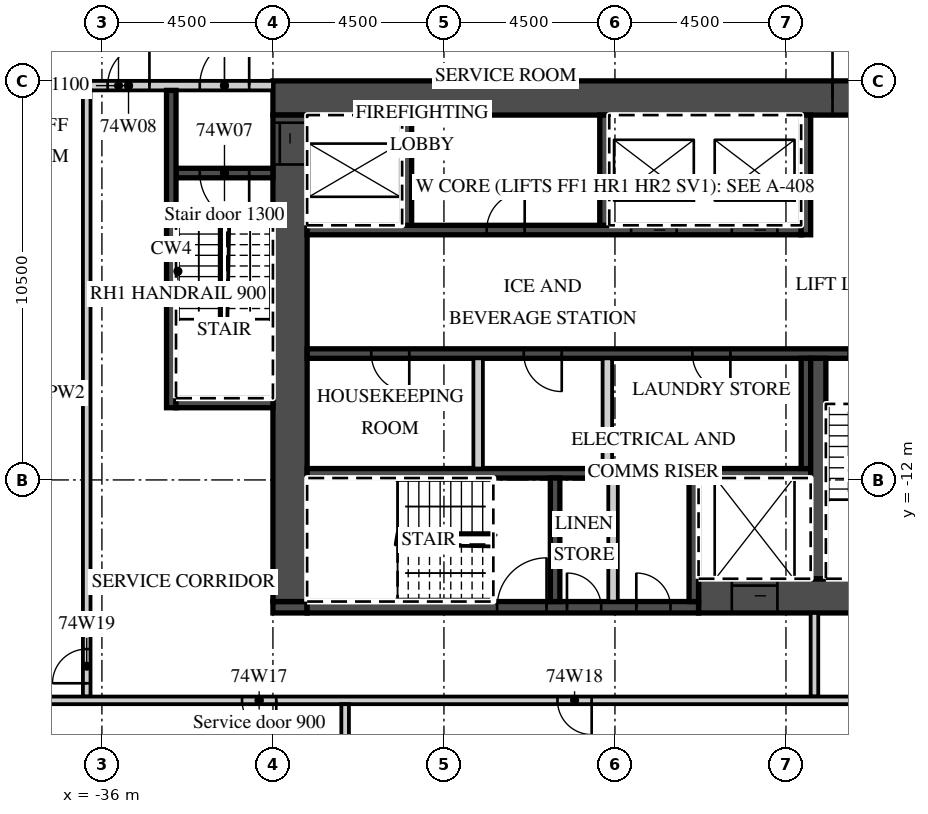
"""IFC4 building model, lengths in metres.
Left out: names, types, materials, properties, quantities, classifications, styles, units other than length and angle.
Written with IfcOpenShell. Run it as: python <this file> out.ifc"""

import sys

from ifc_helpers import new_model, si_unit, direction, frame, frame_2d, origin, place, context, subcontext, project, spatial, rectangle, extrude, element, fill, save


model = new_model("IFC4")
c1 = context("Model", 3, precision=1e-05, world=origin(), true_north=direction((0.0, 1.0)))
c2 = subcontext(c1, "Body", "Model", "MODEL_VIEW")
j1 = project(units=[si_unit("LENGTHUNIT", "METRE"), si_unit("PLANEANGLEUNIT", "RADIAN")], contexts=[c1])
p1 = place(None, origin())
s1 = spatial("IfcSite", under=j1, at=p1, CompositionType="ELEMENT")
p2 = place(p1, origin())
s2 = spatial("IfcBuilding", under=s1, at=p2, CompositionType="ELEMENT")
p3 = place(p2, frame((0.0, 0.0, 294.9)))
s3 = spatial("IfcBuildingStorey", under=s2, at=p3, CompositionType="ELEMENT", Elevation=294.9)
p4 = place(p3, frame((-31.5, -1.95, 0.0), z_axis=(0.0, 0.0, 1.0), x_axis=(1.0, 0.0, 0.0)))
e1 = element("IfcWall", 1, at=p4, inside=s3, PredefinedType="SHEAR", context=c2, shape_type="SweptSolid", body=[
    extrude(rectangle(XDim=18.0, YDim=0.9, at=frame_2d((9.0, 0.0))), origin(), (0.0, 0.0, 1.0), 3.02),
])
p5 = place(p4, frame((14.725, 0.0, 0.0)))
e2 = element("IfcOpeningElement", 2, at=p5, cuts=e1, PredefinedType="OPENING", context=c2, shape_type="SweptSolid", body=[
    extrude(rectangle(XDim=1.8, YDim=2.1, at=frame_2d((0.9, 1.05))), frame((0.0, 0.46, 0.0), z_axis=(0.0, -1.0, 0.0), x_axis=(1.0, 0.0, 0.0)), (0.0, 0.0, 1.0), 0.92),
])
p6 = place(p3, frame((-20.3, -15.05, 0.0), z_axis=(0.0, 0.0, 1.0), x_axis=(1.0, 0.0, 0.0)))
e3 = element("IfcWall", 3, at=p6, inside=s3, PredefinedType="SHEAR", context=c2, shape_type="SweptSolid", body=[
    extrude(rectangle(XDim=6.8, YDim=0.9, at=frame_2d((3.4, 0.0))), origin(), (0.0, 0.0, 1.0), 3.02),
])
p7 = place(p6, frame((0.875, 0.0, 0.0)))
e4 = element("IfcOpeningElement", 4, at=p7, cuts=e3, PredefinedType="OPENING", context=c2, shape_type="SweptSolid", body=[
    extrude(rectangle(XDim=1.2, YDim=2.1, at=frame_2d((0.6, 1.05))), frame((0.0, 0.46, 0.0), z_axis=(0.0, -1.0, 0.0), x_axis=(1.0, 0.0, 0.0)), (0.0, 0.0, 1.0), 0.92),
])
p8 = place(p3, frame((-31.5, -15.35, 0.0), z_axis=(0.0, 0.0, 1.0), x_axis=(1.0, 0.0, 0.0)))
e5 = element("IfcWall", 5, at=p8, inside=s3, PredefinedType="SHEAR", context=c2, shape_type="SweptSolid", body=[
    extrude(rectangle(XDim=0.9, YDim=0.3, at=frame_2d((0.45, 0.0))), origin(), (0.0, 0.0, 1.0), 3.02),
])
p9 = place(p3, frame((-30.6, -15.35, 0.0), z_axis=(0.0, 0.0, 1.0), x_axis=(1.0, 0.0, 0.0)))
e6 = element("IfcWall", 6, at=p9, inside=s3, PredefinedType="SHEAR", context=c2, shape_type="SweptSolid", body=[
    extrude(rectangle(XDim=10.3, YDim=0.3, at=frame_2d((5.15, 0.0))), origin(), (0.0, 0.0, 1.0), 3.02),
])
p10 = place(p9, frame((5.0, 0.0, 0.0)))
e7 = element("IfcOpeningElement", 7, at=p10, cuts=e6, PredefinedType="OPENING", context=c2, shape_type="SweptSolid", body=[
    extrude(rectangle(XDim=1.3, YDim=2.1, at=frame_2d((0.65, 1.05))), frame((0.0, 0.16, 0.0), z_axis=(0.0, -1.0, 0.0), x_axis=(1.0, 0.0, 0.0)), (0.0, 0.0, 1.0), 0.32),
])
p11 = place(p9, frame((6.837, 0.0, 0.0)))
e8 = element("IfcOpeningElement", 8, at=p11, cuts=e6, PredefinedType="OPENING", context=c2, shape_type="SweptSolid", body=[
    extrude(rectangle(XDim=0.9, YDim=2.1, at=frame_2d((0.45, 1.05))), frame((0.0, 0.16, 0.0), z_axis=(0.0, -1.0, 0.0), x_axis=(1.0, 0.0, 0.0)), (0.0, 0.0, 1.0), 0.32),
])
p12 = place(p9, frame((8.663, 0.0, 0.0)))
e9 = element("IfcOpeningElement", 9, at=p12, cuts=e6, PredefinedType="OPENING", context=c2, shape_type="SweptSolid", body=[
    extrude(rectangle(XDim=0.9, YDim=2.1, at=frame_2d((0.45, 1.05))), frame((0.0, 0.16, 0.0), z_axis=(0.0, -1.0, 0.0), x_axis=(1.0, 0.0, 0.0)), (0.0, 0.0, 1.0), 0.32),
])
p13 = place(p3, frame((-31.05, -15.2, 0.0), z_axis=(0.0, 0.0, 1.0), x_axis=(0.0, 1.0, 0.0)))
e10 = element("IfcWall", 10, at=p13, inside=s3, PredefinedType="SHEAR", context=c2, shape_type="SweptSolid", body=[
    extrude(rectangle(XDim=12.8, YDim=0.9, at=frame_2d((6.4, 0.0))), origin(), (0.0, 0.0, 1.0), 3.02),
])
p14 = place(p13, frame((11.5, 0.0, 0.0)))
e11 = element("IfcOpeningElement", 11, at=p14, cuts=e10, PredefinedType="OPENING", context=c2, shape_type="SweptSolid", body=[
    extrude(rectangle(XDim=1.1, YDim=2.1, at=frame_2d((0.55, 1.05))), frame((0.0, 0.46, 0.0), z_axis=(0.0, -1.0, 0.0), x_axis=(1.0, 0.0, 0.0)), (0.0, 0.0, 1.0), 0.92),
])
p15 = place(p3, frame((-30.6, -5.425, 0.0), z_axis=(0.0, 0.0, 1.0), x_axis=(1.0, 0.0, 0.0)))
e12 = element("IfcWall", 12, at=p15, inside=s3, PredefinedType="SHEAR", context=c2, shape_type="SweptSolid", body=[
    extrude(rectangle(XDim=13.0, YDim=0.25, at=frame_2d((6.5, 0.0))), origin(), (0.0, 0.0, 1.0), 3.02),
])
p16 = place(p15, frame((8.525, 0.0, 0.0)))
e13 = element("IfcOpeningElement", 13, at=p16, cuts=e12, PredefinedType="OPENING", context=c2, shape_type="SweptSolid", body=[
    extrude(rectangle(XDim=1.2, YDim=2.1, at=frame_2d((0.6, 1.05))), frame((0.0, 0.135, 0.0), z_axis=(0.0, -1.0, 0.0), x_axis=(1.0, 0.0, 0.0)), (0.0, 0.0, 1.0), 0.27),
])
p17 = place(p15, frame((11.175, 0.0, 0.0)))
e14 = element("IfcOpeningElement", 14, at=p17, cuts=e12, PredefinedType="OPENING", context=c2, shape_type="SweptSolid", body=[
    extrude(rectangle(XDim=1.2, YDim=2.1, at=frame_2d((0.6, 1.05))), frame((0.0, 0.135, 0.0), z_axis=(0.0, -1.0, 0.0), x_axis=(1.0, 0.0, 0.0)), (0.0, 0.0, 1.0), 0.27),
])
p18 = place(p15, frame((4.725, 0.0, 0.0)))
e15 = element("IfcOpeningElement", 15, at=p18, cuts=e12, PredefinedType="OPENING", context=c2, shape_type="SweptSolid", body=[
    extrude(rectangle(XDim=1.0, YDim=2.1, at=frame_2d((0.5, 1.05))), frame((0.0, 0.135, 0.0), z_axis=(0.0, -1.0, 0.0), x_axis=(1.0, 0.0, 0.0)), (0.0, 0.0, 1.0), 0.27),
])
p19 = place(p3, frame((-17.475, -5.55, 0.0), z_axis=(0.0, 0.0, 1.0), x_axis=(0.0, 1.0, 0.0)))
e16 = element("IfcWall", 16, at=p19, inside=s3, PredefinedType="SHEAR", context=c2, shape_type="SweptSolid", body=[
    extrude(rectangle(XDim=3.15, YDim=0.25, at=frame_2d((1.575, 0.0))), origin(), (0.0, 0.0, 1.0), 3.02),
])
for number, where, z_axis, x_axis in (
    (17, (-27.975, -5.3, 0.0), (0.0, 0.0, 1.0), (0.0, 1.0, 0.0)),
    (18, (-22.775, -5.3, 0.0), (0.0, 0.0, 1.0), (0.0, 1.0, 0.0)),
):
    element("IfcWall", number, at=place(p3, frame(where, z_axis=z_axis, x_axis=x_axis)), inside=s3, PredefinedType="SHEAR", context=c2, shape_type="SweptSolid", body=[
        extrude(rectangle(XDim=2.9, YDim=0.25, at=frame_2d((1.45, 0.0))), origin(), (0.0, 0.0, 1.0), 3.02),
    ])
p20 = place(p3, frame((-30.6, -8.675, 0.0), z_axis=(0.0, 0.0, 1.0), x_axis=(1.0, 0.0, 0.0)))
e19 = element("IfcWall", 19, at=p20, inside=s3, PredefinedType="SHEAR", context=c2, shape_type="SweptSolid", body=[
    extrude(rectangle(XDim=16.2, YDim=0.25, at=frame_2d((8.1, 0.0))), origin(), (0.0, 0.0, 1.0), 3.02),
])
p21 = place(p20, frame((14.25, 0.0, 0.0)))
e20 = element("IfcOpeningElement", 20, at=p21, cuts=e19, PredefinedType="OPENING", context=c2, shape_type="SweptSolid", body=[
    extrude(rectangle(XDim=1.3, YDim=2.1, at=frame_2d((0.65, 1.05))), frame((0.0, 0.135, 0.0), z_axis=(0.0, -1.0, 0.0), x_axis=(1.0, 0.0, 0.0)), (0.0, 0.0, 1.0), 0.27),
])
p22 = place(p20, frame((1.688, 0.0, 0.0)))
e21 = element("IfcOpeningElement", 21, at=p22, cuts=e19, PredefinedType="OPENING", context=c2, shape_type="SweptSolid", body=[
    extrude(rectangle(XDim=1.0, YDim=2.1, at=frame_2d((0.5, 1.05))), frame((0.0, 0.135, 0.0), z_axis=(0.0, -1.0, 0.0), x_axis=(1.0, 0.0, 0.0)), (0.0, 0.0, 1.0), 0.27),
])
p23 = place(p20, frame((5.7, 0.0, 0.0)))
e22 = element("IfcOpeningElement", 22, at=p23, cuts=e19, PredefinedType="OPENING", context=c2, shape_type="SweptSolid", body=[
    extrude(rectangle(XDim=1.0, YDim=2.1, at=frame_2d((0.5, 1.05))), frame((0.0, 0.135, 0.0), z_axis=(0.0, -1.0, 0.0), x_axis=(1.0, 0.0, 0.0)), (0.0, 0.0, 1.0), 0.27),
])
p24 = place(p20, frame((10.137, 0.0, 0.0)))
e23 = element("IfcOpeningElement", 23, at=p24, cuts=e19, PredefinedType="OPENING", context=c2, shape_type="SweptSolid", body=[
    extrude(rectangle(XDim=1.0, YDim=2.1, at=frame_2d((0.5, 1.05))), frame((0.0, 0.135, 0.0), z_axis=(0.0, -1.0, 0.0), x_axis=(1.0, 0.0, 0.0)), (0.0, 0.0, 1.0), 0.27),
])
p25 = place(p3, frame((-30.6, -11.825, 0.0), z_axis=(0.0, 0.0, 1.0), x_axis=(1.0, 0.0, 0.0)))
e24 = element("IfcWall", 24, at=p25, inside=s3, PredefinedType="SHEAR", context=c2, shape_type="SweptSolid", body=[
    extrude(rectangle(XDim=13.25, YDim=0.25, at=frame_2d((6.625, 0.0))), origin(), (0.0, 0.0, 1.0), 3.02),
])
p26 = place(p3, frame((-17.475, -11.7, 0.0), z_axis=(0.0, 0.0, 1.0), x_axis=(0.0, 1.0, 0.0)))
e25 = element("IfcWall", 25, at=p26, inside=s3, PredefinedType="SHEAR", context=c2, shape_type="SweptSolid", body=[
    extrude(rectangle(XDim=2.9, YDim=0.25, at=frame_2d((1.45, 0.0))), origin(), (0.0, 0.0, 1.0), 3.02),
])
for number, where, z_axis, x_axis in (
    (26, (-26.1, -11.7, 0.0), (0.0, 0.0, 1.0), (0.0, 1.0, 0.0)),
    (27, (-22.7, -11.7, 0.0), (0.0, 0.0, 1.0), (0.0, 1.0, 0.0)),
):
    element("IfcWall", number, at=place(p3, frame(where, z_axis=z_axis, x_axis=x_axis)), inside=s3, PredefinedType="PARTITIONING", context=c2, shape_type="SweptSolid", body=[
        extrude(rectangle(XDim=2.9, YDim=0.25, at=frame_2d((1.45, 0.0))), origin(), (0.0, 0.0, 1.0), 3.02),
    ])
p27 = place(p3, frame((-17.15, -14.6, 0.0), z_axis=(0.0, 0.0, 1.0), x_axis=(0.0, 1.0, 0.0)))
e28 = element("IfcWall", 28, at=p27, inside=s3, PredefinedType="SHEAR", context=c2, shape_type="SweptSolid", body=[
    extrude(rectangle(XDim=5.8, YDim=0.4, at=frame_2d((2.9, 0.0))), origin(), (0.0, 0.0, 1.0), 3.02),
])
for number, where, z_axis, x_axis in (
    (29, (-20.425, -15.2, 0.0), (0.0, 0.0, 1.0), (0.0, 1.0, 0.0)),
    (30, (-24.075, -15.2, 0.0), (0.0, 0.0, 1.0), (0.0, 1.0, 0.0)),
):
    element("IfcWall", number, at=place(p3, frame(where, z_axis=z_axis, x_axis=x_axis)), inside=s3, PredefinedType="SHEAR", context=c2, shape_type="SweptSolid", body=[
        extrude(rectangle(XDim=3.25, YDim=0.25, at=frame_2d((1.625, 0.0))), origin(), (0.0, 0.0, 1.0), 3.02),
    ])
p28 = place(p3, frame((-22.55, -15.2, 0.0), z_axis=(0.0, 0.0, 1.0), x_axis=(0.0, 1.0, 0.0)))
e31 = element("IfcWall", 31, at=p28, inside=s3, PredefinedType="PARTITIONING", context=c2, shape_type="SweptSolid", body=[
    extrude(rectangle(XDim=3.25, YDim=0.25, at=frame_2d((1.625, 0.0))), origin(), (0.0, 0.0, 1.0), 3.02),
])
p29 = place(p3, frame((-39.627, -1.625, 0.0), z_axis=(0.0, 0.0, 1.0), x_axis=(1.0, 0.0, 0.0)))
e32 = element("IfcWall", 32, at=p29, inside=s3, PredefinedType="PARTITIONING", context=c2, shape_type="SweptSolid", body=[
    extrude(rectangle(XDim=8.127, YDim=0.25, at=frame_2d((4.063, 0.0))), origin(), (0.0, 0.0, 1.0), 3.02),
])
p30 = place(p29, frame((6.202, 0.0, 0.0)))
e33 = element("IfcOpeningElement", 33, at=p30, cuts=e32, PredefinedType="OPENING", context=c2, shape_type="SweptSolid", body=[
    extrude(rectangle(XDim=1.3, YDim=2.1, at=frame_2d((0.65, 1.05))), frame((0.0, 0.135, 0.0), z_axis=(0.0, -1.0, 0.0), x_axis=(1.0, 0.0, 0.0)), (0.0, 0.0, 1.0), 0.27),
])
p31 = place(p29, frame((3.777, 0.0, 0.0)))
e34 = element("IfcOpeningElement", 34, at=p31, cuts=e32, PredefinedType="OPENING", context=c2, shape_type="SweptSolid", body=[
    extrude(rectangle(XDim=1.1, YDim=2.1, at=frame_2d((0.55, 1.05))), frame((0.0, 0.135, 0.0), z_axis=(0.0, -1.0, 0.0), x_axis=(1.0, 0.0, 0.0)), (0.0, 0.0, 1.0), 0.27),
])
p32 = place(p3, frame((-34.05, -3.925, 0.0), z_axis=(0.0, 0.0, 1.0), x_axis=(1.0, 0.0, 0.0)))
e35 = element("IfcWall", 35, at=p32, inside=s3, PredefinedType="SHEAR", context=c2, shape_type="SweptSolid", body=[
    extrude(rectangle(XDim=2.55, YDim=0.25, at=frame_2d((1.275, 0.0))), origin(), (0.0, 0.0, 1.0), 3.02),
])
p33 = place(p32, frame((0.625, 0.0, 0.0)))
e36 = element("IfcOpeningElement", 36, at=p33, cuts=e35, PredefinedType="OPENING", context=c2, shape_type="SweptSolid", body=[
    extrude(rectangle(XDim=1.3, YDim=2.1, at=frame_2d((0.65, 1.05))), frame((0.0, 0.135, 0.0), z_axis=(0.0, -1.0, 0.0), x_axis=(1.0, 0.0, 0.0)), (0.0, 0.0, 1.0), 0.27),
])
p34 = place(p3, frame((-34.175, -10.1, 0.0), z_axis=(0.0, 0.0, 1.0), x_axis=(0.0, 1.0, 0.0)))
e37 = element("IfcWall", 37, at=p34, inside=s3, PredefinedType="SHEAR", context=c2, shape_type="SweptSolid", body=[
    extrude(rectangle(XDim=8.35, YDim=0.25, at=frame_2d((4.175, 0.0))), origin(), (0.0, 0.0, 1.0), 3.02),
])
p35 = place(p3, frame((-34.05, -9.975, 0.0), z_axis=(0.0, 0.0, 1.0), x_axis=(1.0, 0.0, 0.0)))
e38 = element("IfcWall", 38, at=p35, inside=s3, PredefinedType="SHEAR", context=c2, shape_type="SweptSolid", body=[
    extrude(rectangle(XDim=2.55, YDim=0.25, at=frame_2d((1.275, 0.0))), origin(), (0.0, 0.0, 1.0), 3.02),
])
p36 = place(p3, frame((-17.25, -17.7, 0.0), z_axis=(0.0, 0.0, 1.0), x_axis=(0.0, 1.0, 0.0)))
e39 = element("IfcWall", 39, at=p36, inside=s3, PredefinedType="PARTITIONING", context=c2, shape_type="SweptSolid", body=[
    extrude(rectangle(XDim=2.2, YDim=0.2, at=frame_2d((1.1, 0.0))), origin(), (0.0, 0.0, 1.0), 3.02),
])
p37 = place(p3, frame((-36.4, -17.7, 0.0), z_axis=(0.0, 0.0, 1.0), x_axis=(0.0, 1.0, 0.0)))
e40 = element("IfcWall", 40, at=p37, inside=s3, PredefinedType="PARTITIONING", context=c2, shape_type="SweptSolid", body=[
    extrude(rectangle(XDim=15.95, YDim=0.2, at=frame_2d((7.975, 0.0))), origin(), (0.0, 0.0, 1.0), 3.02),
])
p38 = place(p37, frame((0.35, 0.0, 0.0)))
e41 = element("IfcOpeningElement", 41, at=p38, cuts=e40, PredefinedType="OPENING", context=c2, shape_type="SweptSolid", body=[
    extrude(rectangle(XDim=0.9, YDim=2.1, at=frame_2d((0.45, 1.05))), frame((0.0, 0.11, 0.0), z_axis=(0.0, -1.0, 0.0), x_axis=(1.0, 0.0, 0.0)), (0.0, 0.0, 1.0), 0.22),
])
p39 = place(p3, frame((-38.07, -17.8, 0.0), z_axis=(0.0, 0.0, 1.0), x_axis=(1.0, 0.0, 0.0)))
e42 = element("IfcWall", 42, at=p39, inside=s3, PredefinedType="PARTITIONING", context=c2, shape_type="SweptSolid", body=[
    extrude(rectangle(XDim=24.47, YDim=0.2, at=frame_2d((12.235, 0.0))), origin(), (0.0, 0.0, 1.0), 3.02),
])
p40 = place(p39, frame((5.757, 0.0, 0.0)))
e43 = element("IfcOpeningElement", 43, at=p40, cuts=e42, PredefinedType="OPENING", context=c2, shape_type="SweptSolid", body=[
    extrude(rectangle(XDim=0.9, YDim=2.1, at=frame_2d((0.45, 1.05))), frame((0.0, 0.11, 0.0), z_axis=(0.0, -1.0, 0.0), x_axis=(1.0, 0.0, 0.0)), (0.0, 0.0, 1.0), 0.22),
])
p41 = place(p39, frame((14.057, 0.0, 0.0)))
e44 = element("IfcOpeningElement", 44, at=p41, cuts=e42, PredefinedType="OPENING", context=c2, shape_type="SweptSolid", body=[
    extrude(rectangle(XDim=0.9, YDim=2.1, at=frame_2d((0.45, 1.05))), frame((0.0, 0.11, 0.0), z_axis=(0.0, -1.0, 0.0), x_axis=(1.0, 0.0, 0.0)), (0.0, 0.0, 1.0), 0.22),
])
p42 = place(p3, frame((-29.6, -22.947, 0.0), z_axis=(0.0, 0.0, 1.0), x_axis=(0.0, 1.0, 0.0)))
e45 = element("IfcWall", 45, at=p42, inside=s3, PredefinedType="PARTITIONING", context=c2, shape_type="SweptSolid", body=[
    extrude(rectangle(XDim=5.047, YDim=0.2, at=frame_2d((2.523, 0.0))), origin(), (0.0, 0.0, 1.0), 3.02),
])
p43 = place(p16, origin())
e46 = element("IfcDoor", 46, at=p43, inside=s3, OperationType="SLIDING_TO_LEFT", PredefinedType="DOOR", context=c2, shape_type="SweptSolid", body=[
    extrude(rectangle(XDim=1.2, YDim=2.1, at=frame_2d((0.6, 1.05))), frame((0.0, 0.025, 0.0), z_axis=(0.0, -1.0, 0.0), x_axis=(1.0, 0.0, 0.0)), (0.0, 0.0, 1.0), 0.05),
])
fill(e13, e46)
p44 = place(p17, origin())
e47 = element("IfcDoor", 47, at=p44, inside=s3, OperationType="SLIDING_TO_RIGHT", PredefinedType="DOOR", context=c2, shape_type="SweptSolid", body=[
    extrude(rectangle(XDim=1.2, YDim=2.1, at=frame_2d((0.6, 1.05))), frame((0.0, 0.025, 0.0), z_axis=(0.0, -1.0, 0.0), x_axis=(1.0, 0.0, 0.0)), (0.0, 0.0, 1.0), 0.05),
])
fill(e14, e47)
p45 = place(p7, origin())
e48 = element("IfcDoor", 48, at=p45, inside=s3, OperationType="SLIDING_TO_LEFT", PredefinedType="DOOR", context=c2, shape_type="SweptSolid", body=[
    extrude(rectangle(XDim=1.2, YDim=2.1, at=frame_2d((0.6, 1.05))), frame((0.0, 0.025, 0.0), z_axis=(0.0, -1.0, 0.0), x_axis=(1.0, 0.0, 0.0)), (0.0, 0.0, 1.0), 0.05),
])
fill(e4, e48)
p46 = place(p14, origin())
e49 = element("IfcDoor", 49, at=p46, inside=s3, OperationType="SLIDING_TO_RIGHT", PredefinedType="DOOR", context=c2, shape_type="SweptSolid", body=[
    extrude(rectangle(XDim=1.1, YDim=2.1, at=frame_2d((0.55, 1.05))), frame((0.0, 0.025, 0.0), z_axis=(0.0, -1.0, 0.0), x_axis=(1.0, 0.0, 0.0)), (0.0, 0.0, 1.0), 0.05),
])
fill(e11, e49)
p47 = place(p5, origin())
e50 = element("IfcDoor", 50, at=p47, inside=s3, OperationType="DOUBLE_DOOR_DOUBLE_SWING", PredefinedType="DOOR", context=c2, shape_type="SweptSolid", body=[
    extrude(rectangle(XDim=1.8, YDim=2.1, at=frame_2d((0.9, 1.05))), frame((0.0, 0.025, 0.0), z_axis=(0.0, -1.0, 0.0), x_axis=(1.0, 0.0, 0.0)), (0.0, 0.0, 1.0), 0.05),
])
fill(e2, e50)
p48 = place(p30, origin())
e51 = element("IfcDoor", 51, at=p48, inside=s3, OperationType="SINGLE_SWING_RIGHT", PredefinedType="DOOR", context=c2, shape_type="SweptSolid", body=[
    extrude(rectangle(XDim=1.3, YDim=2.1, at=frame_2d((0.65, 1.05))), frame((0.0, 0.025, 0.0), z_axis=(0.0, -1.0, 0.0), x_axis=(1.0, 0.0, 0.0)), (0.0, 0.0, 1.0), 0.05),
])
fill(e33, e51)
p49 = place(p33, origin())
e52 = element("IfcDoor", 52, at=p49, inside=s3, OperationType="SINGLE_SWING_RIGHT", PredefinedType="DOOR", context=c2, shape_type="SweptSolid", body=[
    extrude(rectangle(XDim=1.3, YDim=2.1, at=frame_2d((0.65, 1.05))), frame((0.0, 0.025, 0.0), z_axis=(0.0, -1.0, 0.0), x_axis=(1.0, 0.0, 0.0)), (0.0, 0.0, 1.0), 0.05),
])
fill(e36, e52)
p50 = place(p31, origin())
e53 = element("IfcDoor", 53, at=p50, inside=s3, OperationType="SINGLE_SWING_RIGHT", PredefinedType="DOOR", context=c2, shape_type="SweptSolid", body=[
    extrude(rectangle(XDim=1.1, YDim=2.1, at=frame_2d((0.55, 1.05))), frame((0.0, 0.025, 0.0), z_axis=(0.0, -1.0, 0.0), x_axis=(1.0, 0.0, 0.0)), (0.0, 0.0, 1.0), 0.05),
])
fill(e34, e53)
p51 = place(p21, origin())
e54 = element("IfcDoor", 54, at=p51, inside=s3, OperationType="SINGLE_SWING_RIGHT", PredefinedType="DOOR", context=c2, shape_type="SweptSolid", body=[
    extrude(rectangle(XDim=1.3, YDim=2.1, at=frame_2d((0.65, 1.05))), frame((0.0, 0.025, 0.0), z_axis=(0.0, -1.0, 0.0), x_axis=(1.0, 0.0, 0.0)), (0.0, 0.0, 1.0), 0.05),
])
fill(e20, e54)
p52 = place(p10, origin())
e55 = element("IfcDoor", 55, at=p52, inside=s3, OperationType="SINGLE_SWING_RIGHT", PredefinedType="DOOR", context=c2, shape_type="SweptSolid", body=[
    extrude(rectangle(XDim=1.3, YDim=2.1, at=frame_2d((0.65, 1.05))), frame((0.0, 0.025, 0.0), z_axis=(0.0, -1.0, 0.0), x_axis=(1.0, 0.0, 0.0)), (0.0, 0.0, 1.0), 0.05),
])
fill(e7, e55)
p53 = place(p11, origin())
e56 = element("IfcDoor", 56, at=p53, inside=s3, OperationType="SINGLE_SWING_LEFT", PredefinedType="DOOR", context=c2, shape_type="SweptSolid", body=[
    extrude(rectangle(XDim=0.9, YDim=2.1, at=frame_2d((0.45, 1.05))), frame((0.0, 0.025, 0.0), z_axis=(0.0, -1.0, 0.0), x_axis=(1.0, 0.0, 0.0)), (0.0, 0.0, 1.0), 0.05),
])
fill(e8, e56)
p54 = place(p12, origin())
e57 = element("IfcDoor", 57, at=p54, inside=s3, OperationType="SINGLE_SWING_LEFT", PredefinedType="DOOR", context=c2, shape_type="SweptSolid", body=[
    extrude(rectangle(XDim=0.9, YDim=2.1, at=frame_2d((0.45, 1.05))), frame((0.0, 0.025, 0.0), z_axis=(0.0, -1.0, 0.0), x_axis=(1.0, 0.0, 0.0)), (0.0, 0.0, 1.0), 0.05),
])
fill(e9, e57)
p55 = place(p22, origin())
e58 = element("IfcDoor", 58, at=p55, inside=s3, OperationType="SINGLE_SWING_RIGHT", PredefinedType="DOOR", context=c2, shape_type="SweptSolid", body=[
    extrude(rectangle(XDim=1.0, YDim=2.1, at=frame_2d((0.5, 1.05))), frame((0.0, 0.025, 0.0), z_axis=(0.0, -1.0, 0.0), x_axis=(1.0, 0.0, 0.0)), (0.0, 0.0, 1.0), 0.05),
])
fill(e21, e58)
p56 = place(p23, origin())
e59 = element("IfcDoor", 59, at=p56, inside=s3, OperationType="SINGLE_SWING_RIGHT", PredefinedType="DOOR", context=c2, shape_type="SweptSolid", body=[
    extrude(rectangle(XDim=1.0, YDim=2.1, at=frame_2d((0.5, 1.05))), frame((0.0, 0.025, 0.0), z_axis=(0.0, -1.0, 0.0), x_axis=(1.0, 0.0, 0.0)), (0.0, 0.0, 1.0), 0.05),
])
fill(e22, e59)
p57 = place(p24, origin())
e60 = element("IfcDoor", 60, at=p57, inside=s3, OperationType="SINGLE_SWING_RIGHT", PredefinedType="DOOR", context=c2, shape_type="SweptSolid", body=[
    extrude(rectangle(XDim=1.0, YDim=2.1, at=frame_2d((0.5, 1.05))), frame((0.0, 0.025, 0.0), z_axis=(0.0, -1.0, 0.0), x_axis=(1.0, 0.0, 0.0)), (0.0, 0.0, 1.0), 0.05),
])
fill(e23, e60)
p58 = place(p18, origin())
e61 = element("IfcDoor", 61, at=p58, inside=s3, OperationType="SINGLE_SWING_RIGHT", PredefinedType="DOOR", context=c2, shape_type="SweptSolid", body=[
    extrude(rectangle(XDim=1.0, YDim=2.1, at=frame_2d((0.5, 1.05))), frame((0.0, 0.025, 0.0), z_axis=(0.0, -1.0, 0.0), x_axis=(1.0, 0.0, 0.0)), (0.0, 0.0, 1.0), 0.05),
])
fill(e15, e61)
p59 = place(p40, origin())
e62 = element("IfcDoor", 62, at=p59, inside=s3, OperationType="SINGLE_SWING_RIGHT", PredefinedType="DOOR", context=c2, shape_type="SweptSolid", body=[
    extrude(rectangle(XDim=0.9, YDim=2.1, at=frame_2d((0.45, 1.05))), frame((0.0, 0.025, 0.0), z_axis=(0.0, -1.0, 0.0), x_axis=(1.0, 0.0, 0.0)), (0.0, 0.0, 1.0), 0.05),
])
fill(e43, e62)
p60 = place(p41, origin())
e63 = element("IfcDoor", 63, at=p60, inside=s3, OperationType="SINGLE_SWING_RIGHT", PredefinedType="DOOR", context=c2, shape_type="SweptSolid", body=[
    extrude(rectangle(XDim=0.9, YDim=2.1, at=frame_2d((0.45, 1.05))), frame((0.0, 0.025, 0.0), z_axis=(0.0, -1.0, 0.0), x_axis=(1.0, 0.0, 0.0)), (0.0, 0.0, 1.0), 0.05),
])
fill(e44, e63)
p61 = place(p38, origin())
e64 = element("IfcDoor", 64, at=p61, inside=s3, OperationType="SINGLE_SWING_LEFT", PredefinedType="DOOR", context=c2, shape_type="SweptSolid", body=[
    extrude(rectangle(XDim=0.9, YDim=2.1, at=frame_2d((0.45, 1.05))), frame((0.0, 0.025, 0.0), z_axis=(0.0, -1.0, 0.0), x_axis=(1.0, 0.0, 0.0)), (0.0, 0.0, 1.0), 0.05),
])
fill(e41, e64)
save(model, sys.argv[1])
